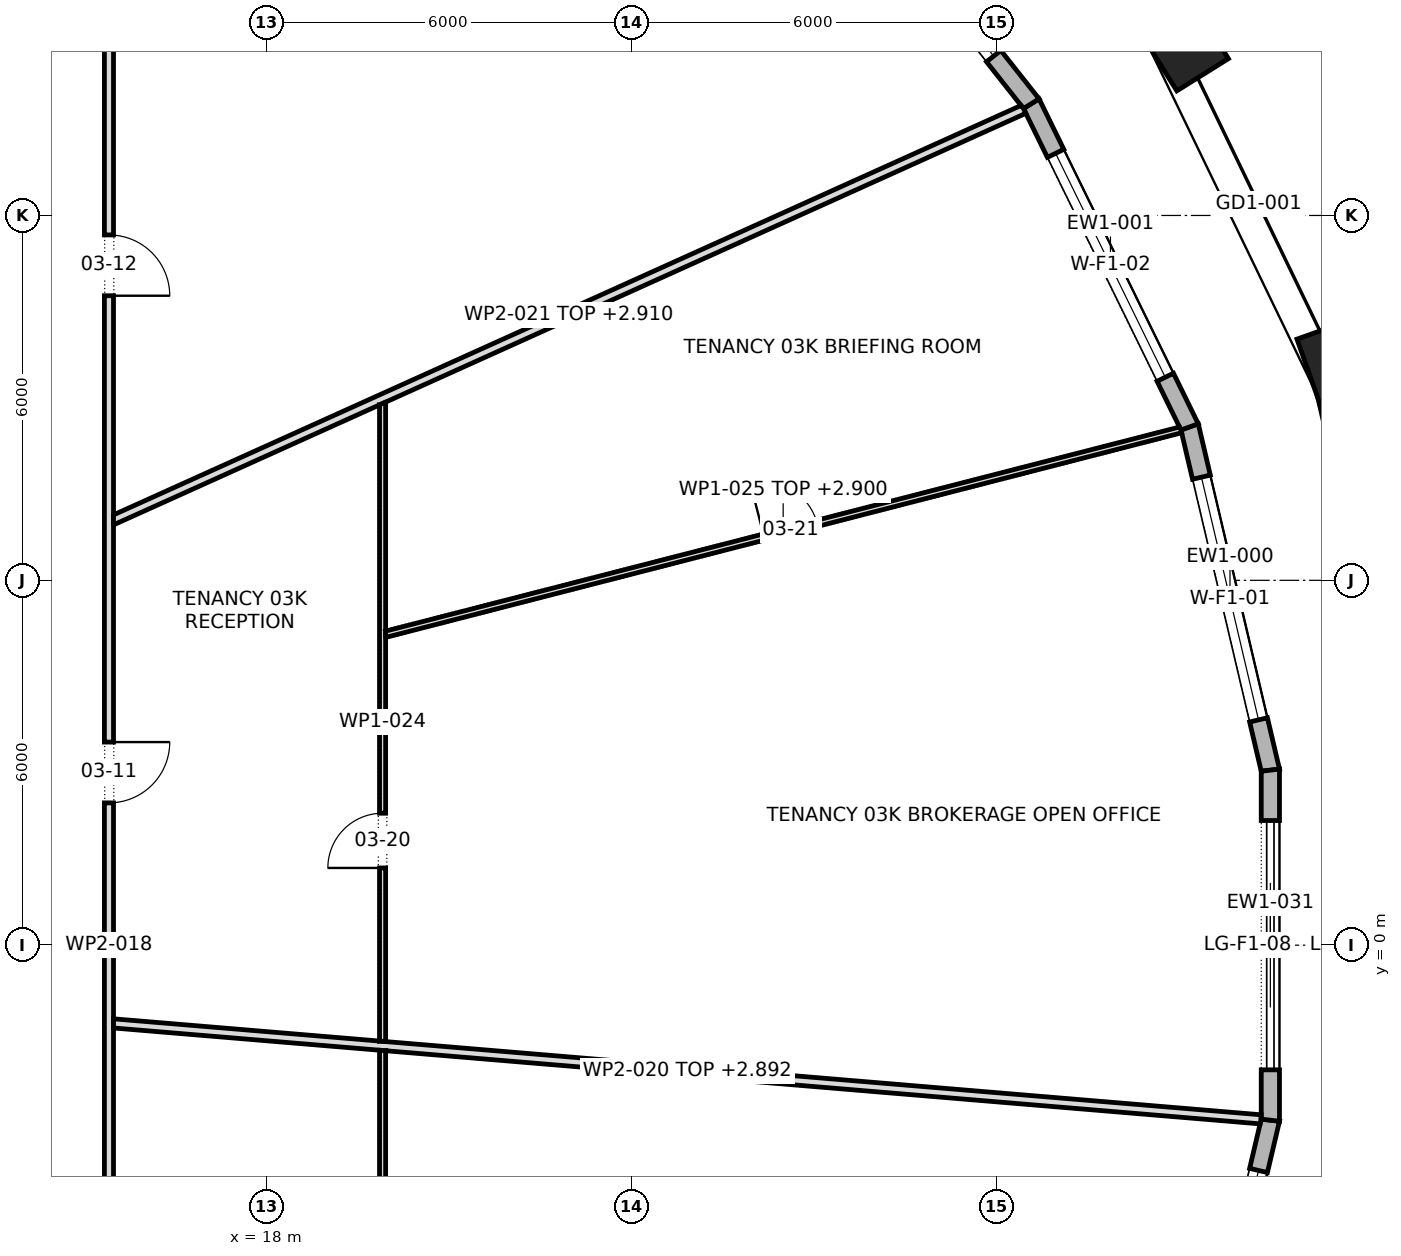
"""IFC4 building model, lengths in metres.
Left out: names, types, materials, properties, quantities, classifications, styles, units other than length and angle.
Written with IfcOpenShell. Run it as: python <this file> out.ifc"""

import sys

from ifc_helpers import new_model, si_unit, direction, frame, frame_2d, origin, origin_2d, place, context, subcontext, project, spatial, polyline, rectangle, outline, extrude, element, fill, save


model = new_model("IFC4")
c1 = context("Model", 3, precision=1e-05, world=origin(), true_north=direction((0.0, 1.0)))
c2 = subcontext(c1, "Body", "Model", "MODEL_VIEW")
j1 = project(units=[si_unit("LENGTHUNIT", "METRE"), si_unit("PLANEANGLEUNIT", "RADIAN")], contexts=[c1])
p1 = place(None, origin())
s1 = spatial("IfcSite", under=j1, at=p1, CompositionType="ELEMENT")
p2 = place(p1, origin())
s2 = spatial("IfcBuilding", under=s1, at=p2, CompositionType="ELEMENT")
p3 = place(p2, frame((0.0, 0.0, 48.7)))
s3 = spatial("IfcBuildingStorey", under=s2, at=p3, CompositionType="ELEMENT", Elevation=48.7)
for number, where, z_axis, x_axis in (
    (1, (35.709, 9.285, 0.0), (0.0, 0.0, 1.0), (-0.334, 0.943, 0.0)),
    (2, (32.91, 15.078, 0.0), (0.0, 0.0, 1.0), (-0.529, 0.849, 0.0)),
):
    element("IfcColumn", number, at=place(p3, frame(where, z_axis=z_axis, x_axis=x_axis)), inside=s3, PredefinedType="COLUMN", context=c2, shape_type="SweptSolid", body=[
        extrude(rectangle(XDim=1.8, YDim=1.0, at=origin_2d()), origin(), (0.0, 0.0, 1.0), 4.2),
    ])
p4 = place(p3, frame((34.5, 2.878, 0.0), z_axis=(0.0, 0.0, 1.0), x_axis=(-0.228990053972, 0.973428762253, 0.0)))
e3 = element("IfcWall", 3, at=p4, inside=s3, PredefinedType="STANDARD", context=c2, shape_type="SweptSolid", body=[
    extrude(outline(polyline([(-0.017, -0.15), (5.816, -0.15), (5.782, 0.15), (0.017, 0.15), (-0.017, -0.15)])), origin(), (0.0, 0.0, 1.0), 3.9),
])
p5 = place(p4, frame((0.849, 0.0, 0.6)))
e4 = element("IfcOpeningElement", 4, at=p5, cuts=e3, PredefinedType="OPENING", context=c2, shape_type="SweptSolid", body=[
    extrude(rectangle(XDim=4.1, YDim=2.85, at=frame_2d((2.05, 1.425))), frame((0.0, 0.162, 0.0), z_axis=(0.0, -1.0, 0.0), x_axis=(1.0, 0.0, 0.0)), (0.0, 0.0, 1.0), 0.324),
])
p6 = place(p3, frame((33.172, 8.523, 0.0), z_axis=(0.0, 0.0, 1.0), x_axis=(-0.439906146647, 0.898043752911, 0.0)))
e5 = element("IfcWall", 5, at=p6, inside=s3, PredefinedType="STANDARD", context=c2, shape_type="SweptSolid", body=[
    extrude(outline(polyline([(-0.017, -0.15), (5.935, -0.15), (5.903, 0.15), (0.017, 0.15), (-0.017, -0.15)])), origin(), (0.0, 0.0, 1.0), 3.9),
])
p7 = place(p6, frame((0.909, 0.0, 0.6)))
e6 = element("IfcOpeningElement", 6, at=p7, cuts=e5, PredefinedType="OPENING", context=c2, shape_type="SweptSolid", body=[
    extrude(rectangle(XDim=4.1, YDim=2.85, at=frame_2d((2.05, 1.425))), frame((0.0, 0.162, 0.0), z_axis=(0.0, -1.0, 0.0), x_axis=(1.0, 0.0, 0.0)), (0.0, 0.0, 1.0), 0.324),
])
p8 = place(p3, frame((30.568, 13.838, 0.0), z_axis=(0.0, 0.0, 1.0), x_axis=(-0.619993638342, 0.78460683684, 0.0)))
e7 = element("IfcWall", 7, at=p8, inside=s3, PredefinedType="STANDARD", context=c2, shape_type="SweptSolid", body=[
    extrude(outline(polyline([(-0.016, -0.15), (6.109, -0.15), (6.079, 0.15), (0.016, 0.15), (-0.016, -0.15)])), origin(), (0.0, 0.0, 1.0), 3.9),
])
p9 = place(p8, frame((0.997, 0.0, 0.6)))
e8 = element("IfcOpeningElement", 8, at=p9, cuts=e7, PredefinedType="OPENING", context=c2, shape_type="SweptSolid", body=[
    extrude(rectangle(XDim=4.1, YDim=2.85, at=frame_2d((2.05, 1.425))), frame((0.0, 0.162, 0.0), z_axis=(0.0, -1.0, 0.0), x_axis=(1.0, 0.0, 0.0)), (0.0, 0.0, 1.0), 0.324),
])
p10 = place(p3, frame((33.172, -8.523, 0.0), z_axis=(0.0, 0.0, 1.0), x_axis=(0.228990053972, 0.973428762253, 0.0)))
e9 = element("IfcWall", 9, at=p10, inside=s3, PredefinedType="STANDARD", context=c2, shape_type="SweptSolid", body=[
    extrude(outline(polyline([(-0.017, -0.15), (5.816, -0.15), (5.781, 0.15), (0.017, 0.15), (-0.017, -0.15)])), origin(), (0.0, 0.0, 1.0), 3.9),
])
p11 = place(p10, frame((0.849, 0.0, 0.6)))
e10 = element("IfcOpeningElement", 10, at=p11, cuts=e9, PredefinedType="OPENING", context=c2, shape_type="SweptSolid", body=[
    extrude(rectangle(XDim=4.1, YDim=2.85, at=frame_2d((2.05, 1.425))), frame((0.0, 0.162, 0.0), z_axis=(0.0, -1.0, 0.0), x_axis=(1.0, 0.0, 0.0)), (0.0, 0.0, 1.0), 0.324),
])
p12 = place(p3, frame((34.5, -2.878, 0.0), z_axis=(0.0, 0.0, 1.0), x_axis=(0.0, 1.0, 0.0)))
e11 = element("IfcWall", 11, at=p12, inside=s3, PredefinedType="STANDARD", context=c2, shape_type="SweptSolid", body=[
    extrude(outline(polyline([(-0.017, -0.15), (5.773, -0.15), (5.739, 0.15), (0.017, 0.15), (-0.017, -0.15)])), origin(), (0.0, 0.0, 1.0), 3.9),
])
p13 = place(p12, frame((0.828, 0.0, 0.0)))
e12 = element("IfcOpeningElement", 12, at=p13, cuts=e11, PredefinedType="OPENING", context=c2, shape_type="SweptSolid", body=[
    extrude(rectangle(XDim=4.1, YDim=3.45, at=frame_2d((2.05, 1.725))), frame((0.0, 0.162, 0.0), z_axis=(0.0, -1.0, 0.0), x_axis=(1.0, 0.0, 0.0)), (0.0, 0.0, 1.0), 0.324),
])
p14 = place(p3, frame((15.4, -15.475, 0.0), z_axis=(0.0, 0.0, 1.0), x_axis=(0.0, 1.0, 0.0)))
e13 = element("IfcWall", 13, at=p14, inside=s3, PredefinedType="PARTITIONING", context=c2, shape_type="SweptSolid", body=[
    extrude(outline(polyline([(0.0, -0.075), (1.935, -0.075), (3.869, -0.075), (5.803, -0.075), (7.738, -0.075), (9.672, -0.075), (11.606, -0.075), (13.541, -0.075), (15.475, -0.075), (17.409, -0.075), (19.344, -0.075), (21.278, -0.075), (23.212, -0.075), (25.147, -0.075), (27.081, -0.075), (29.016, -0.075), (30.95, -0.075), (30.8, 0.075), (28.885, 0.075), (26.969, 0.075), (25.053, 0.075), (23.138, 0.075), (21.222, 0.075), (19.306, 0.075), (17.391, 0.075), (15.475, 0.075), (13.56, 0.075), (11.644, 0.075), (9.728, 0.075), (7.812, 0.075), (5.897, 0.075), (3.981, 0.075), (2.066, 0.075), (0.15, 0.075), (0.0, -0.075)])), origin(), (0.0, 0.0, 1.0), 3.9),
])
p15 = place(p14, frame((8.99, 0.0, 0.0)))
e14 = element("IfcOpeningElement", 14, at=p15, cuts=e13, PredefinedType="OPENING", context=c2, shape_type="SweptSolid", body=[
    extrude(rectangle(XDim=1.0, YDim=2.1, at=frame_2d((0.5, 1.05))), frame((0.0, 0.087, 0.0), z_axis=(0.0, -1.0, 0.0), x_axis=(1.0, 0.0, 0.0)), (0.0, 0.0, 1.0), 0.174),
])
p16 = place(p14, frame((17.815, 0.0, 0.0)))
e15 = element("IfcOpeningElement", 15, at=p16, cuts=e13, PredefinedType="OPENING", context=c2, shape_type="SweptSolid", body=[
    extrude(rectangle(XDim=1.0, YDim=2.1, at=frame_2d((0.5, 1.05))), frame((0.0, 0.087, 0.0), z_axis=(0.0, -1.0, 0.0), x_axis=(1.0, 0.0, 0.0)), (0.0, 0.0, 1.0), 0.174),
])
p17 = place(p14, frame((26.155, 0.0, 0.0)))
e16 = element("IfcOpeningElement", 16, at=p17, cuts=e13, PredefinedType="OPENING", context=c2, shape_type="SweptSolid", body=[
    extrude(rectangle(XDim=1.0, YDim=2.1, at=frame_2d((0.5, 1.05))), frame((0.0, 0.087, 0.0), z_axis=(0.0, -1.0, 0.0), x_axis=(1.0, 0.0, 0.0)), (0.0, 0.0, 1.0), 0.174),
])
p18 = place(p3, frame((15.469, -1.286, 0.0), z_axis=(0.0, 0.0, 1.0), x_axis=(0.996520554602, -0.083347371018, 0.0)))
e17 = element("IfcWall", 17, at=p18, inside=s3, PredefinedType="PARTITIONING", context=c2, shape_type="SweptSolid", body=[
    extrude(outline(polyline([(0.012, -0.075), (1.506, -0.075), (2.999, -0.075), (4.492, -0.075), (4.503, -0.074), (4.503, -0.075), (6.307, -0.075), (8.111, -0.075), (9.915, -0.075), (11.719, -0.075), (13.523, -0.075), (15.327, -0.075), (17.131, -0.075), (18.935, -0.075), (18.94, -0.038), (18.94, 0.075), (17.122, 0.075), (15.304, 0.075), (13.486, 0.075), (11.667, 0.075), (9.849, 0.075), (8.031, 0.075), (6.213, 0.075), (4.395, 0.075), (4.39, 0.074), (4.39, 0.075), (2.927, 0.075), (1.463, 0.075), (0.0, 0.075), (0.012, -0.075)])), origin(), (0.0, 0.0, 1.0), 2.892),
])
p19 = place(p3, frame((15.444, 6.98, 0.0), z_axis=(0.0, 0.0, 1.0), x_axis=(0.911545333682, 0.411199592221, 0.0)))
e18 = element("IfcWall", 18, at=p19, inside=s3, PredefinedType="PARTITIONING", context=c2, shape_type="SweptSolid", body=[
    extrude(outline(polyline([(0.0, -0.075), (1.6, -0.075), (3.2, -0.075), (4.8, -0.075), (4.801, -0.073), (4.805, -0.075), (6.747, -0.075), (8.69, -0.075), (10.632, -0.075), (12.574, -0.075), (14.517, -0.075), (16.459, -0.075), (16.459, -0.072), (16.457, 0.012), (16.441, 0.075), (14.622, 0.075), (12.802, 0.075), (10.983, 0.075), (9.164, 0.075), (7.345, 0.075), (5.525, 0.075), (3.706, 0.075), (1.887, 0.075), (0.068, 0.075), (0.0, -0.075)])), origin(), (0.0, 0.0, 1.0), 2.91),
])
p20 = place(p3, frame((19.9, -13.756, 0.0), z_axis=(0.0, 0.0, 1.0), x_axis=(0.0, 1.0, 0.0)))
e19 = element("IfcWall", 19, at=p20, inside=s3, PredefinedType="PARTITIONING", context=c2, shape_type="SweptSolid", body=[
    extrude(outline(polyline([(0.0, -0.05), (1.563, -0.05), (3.125, -0.05), (4.688, -0.05), (4.689, -0.048), (4.694, -0.05), (6.525, -0.05), (8.357, -0.05), (10.188, -0.05), (12.02, -0.05), (12.028, 0.049), (12.028, 0.05), (10.035, 0.05), (8.042, 0.05), (6.049, 0.05), (4.056, 0.05), (2.062, 0.05), (0.069, 0.05), (0.0, -0.05), (0.0, -0.05)])), origin(), (0.0, 0.0, 1.0), 3.9),
])
p21 = place(p20, frame((7.98, 0.0, 0.0)))
e20 = element("IfcOpeningElement", 20, at=p21, cuts=e19, PredefinedType="OPENING", context=c2, shape_type="SweptSolid", body=[
    extrude(rectangle(XDim=0.9, YDim=2.1, at=frame_2d((0.45, 1.05))), frame((0.0, 0.062, 0.0), z_axis=(0.0, -1.0, 0.0), x_axis=(1.0, 0.0, 0.0)), (0.0, 0.0, 1.0), 0.124),
])
p22 = place(p3, frame((19.9, -1.585, 0.0), z_axis=(0.0, 0.0, 1.0), x_axis=(0.0, 1.0, 0.0)))
e21 = element("IfcWall", 21, at=p22, inside=s3, PredefinedType="PARTITIONING", context=c2, shape_type="SweptSolid", body=[
    extrude(outline(polyline([(0.0, -0.05), (1.686, -0.05), (3.371, -0.05), (5.056, -0.05), (6.742, -0.05), (6.749, -0.048), (6.75, -0.05), (8.632, -0.05), (10.515, -0.05), (10.515, -0.049), (10.47, 0.05), (8.726, 0.05), (6.983, 0.05), (5.239, 0.05), (3.495, 0.05), (1.752, 0.05), (0.008, 0.05), (0.0, -0.046), (0.0, -0.05)])), origin(), (0.0, 0.0, 1.0), 3.9),
])
p23 = place(p22, frame((2.855, 0.0, 0.0)))
e22 = element("IfcOpeningElement", 22, at=p23, cuts=e21, PredefinedType="OPENING", context=c2, shape_type="SweptSolid", body=[
    extrude(rectangle(XDim=0.9, YDim=2.1, at=frame_2d((0.45, 1.05))), frame((0.0, 0.062, 0.0), z_axis=(0.0, -1.0, 0.0), x_axis=(1.0, 0.0, 0.0)), (0.0, 0.0, 1.0), 0.124),
])
p24 = place(p3, frame((19.938, 5.11, 0.0), z_axis=(0.0, 0.0, 1.0), x_axis=(0.968505877435, 0.248990693348, 0.0)))
e23 = element("IfcWall", 23, at=p24, inside=s3, PredefinedType="PARTITIONING", context=c2, shape_type="SweptSolid", body=[
    extrude(outline(polyline([(13.515, -0.05), (13.515, 0.003), (13.506, 0.05), (11.58, 0.05), (9.654, 0.05), (7.729, 0.05), (5.803, 0.05), (3.877, 0.05), (1.951, 0.05), (0.026, 0.05), (0.0, -0.049), (0.0, -0.05), (1.931, -0.05), (3.862, -0.05), (5.792, -0.05), (7.723, -0.05), (9.654, -0.05), (11.585, -0.05), (13.515, -0.05)])), origin(), (0.0, 0.0, 1.0), 2.9),
])
p25 = place(p24, frame((6.439, 0.0, 0.0)))
e24 = element("IfcOpeningElement", 24, at=p25, cuts=e23, PredefinedType="OPENING", context=c2, shape_type="SweptSolid", body=[
    extrude(rectangle(XDim=0.9, YDim=2.1, at=frame_2d((0.45, 1.05))), frame((0.0, 0.062, 0.0), z_axis=(0.0, -1.0, 0.0), x_axis=(1.0, 0.0, 0.0)), (0.0, 0.0, 1.0), 0.124),
])
p26 = place(p5, origin())
e25 = element("IfcWindow", 25, at=p26, inside=s3, PartitioningType="TRIPLE_PANEL_VERTICAL", PredefinedType="WINDOW", context=c2, shape_type="SweptSolid", body=[
    extrude(rectangle(XDim=4.1, YDim=2.85, at=frame_2d((2.05, 1.425))), frame((0.0, 0.03, 0.0), z_axis=(0.0, -1.0, 0.0), x_axis=(1.0, 0.0, 0.0)), (0.0, 0.0, 1.0), 0.06),
])
fill(e4, e25)
p27 = place(p7, origin())
e26 = element("IfcWindow", 26, at=p27, inside=s3, PartitioningType="TRIPLE_PANEL_VERTICAL", PredefinedType="WINDOW", context=c2, shape_type="SweptSolid", body=[
    extrude(rectangle(XDim=4.1, YDim=2.85, at=frame_2d((2.05, 1.425))), frame((0.0, 0.03, 0.0), z_axis=(0.0, -1.0, 0.0), x_axis=(1.0, 0.0, 0.0)), (0.0, 0.0, 1.0), 0.06),
])
fill(e6, e26)
p28 = place(p9, origin())
e27 = element("IfcWindow", 27, at=p28, inside=s3, PartitioningType="TRIPLE_PANEL_VERTICAL", PredefinedType="WINDOW", context=c2, shape_type="SweptSolid", body=[
    extrude(rectangle(XDim=4.1, YDim=2.85, at=frame_2d((2.05, 1.425))), frame((0.0, 0.03, 0.0), z_axis=(0.0, -1.0, 0.0), x_axis=(1.0, 0.0, 0.0)), (0.0, 0.0, 1.0), 0.06),
])
fill(e8, e27)
p29 = place(p11, origin())
e28 = element("IfcWindow", 28, at=p29, inside=s3, PartitioningType="TRIPLE_PANEL_VERTICAL", PredefinedType="WINDOW", context=c2, shape_type="SweptSolid", body=[
    extrude(rectangle(XDim=4.1, YDim=2.85, at=frame_2d((2.05, 1.425))), frame((0.0, 0.03, 0.0), z_axis=(0.0, -1.0, 0.0), x_axis=(1.0, 0.0, 0.0)), (0.0, 0.0, 1.0), 0.06),
])
fill(e10, e28)
p30 = place(p13, origin())
e29 = element("IfcDoor", 29, at=p30, inside=s3, OperationType="DOUBLE_DOOR_SLIDING", PredefinedType="DOOR", context=c2, shape_type="SweptSolid", body=[
    extrude(rectangle(XDim=4.1, YDim=3.45, at=frame_2d((2.05, 1.725))), frame((0.0, 0.025, 0.0), z_axis=(0.0, -1.0, 0.0), x_axis=(1.0, 0.0, 0.0)), (0.0, 0.0, 1.0), 0.05),
])
fill(e12, e29)
p31 = place(p16, frame((1.0, 0.0, 0.0), z_axis=(0.0, 0.0, 1.0), x_axis=(-1.0, 0.0, 0.0)))
e30 = element("IfcDoor", 30, at=p31, inside=s3, OperationType="SINGLE_SWING_RIGHT", PredefinedType="DOOR", context=c2, shape_type="SweptSolid", body=[
    extrude(rectangle(XDim=1.0, YDim=2.1, at=frame_2d((0.5, 1.05))), frame((0.0, 0.025, 0.0), z_axis=(0.0, -1.0, 0.0), x_axis=(1.0, 0.0, 0.0)), (0.0, 0.0, 1.0), 0.05),
])
fill(e15, e30)
p32 = place(p17, frame((1.0, 0.0, 0.0), z_axis=(0.0, 0.0, 1.0), x_axis=(-1.0, 0.0, 0.0)))
e31 = element("IfcDoor", 31, at=p32, inside=s3, OperationType="SINGLE_SWING_LEFT", PredefinedType="DOOR", context=c2, shape_type="SweptSolid", body=[
    extrude(rectangle(XDim=1.0, YDim=2.1, at=frame_2d((0.5, 1.05))), frame((0.0, 0.025, 0.0), z_axis=(0.0, -1.0, 0.0), x_axis=(1.0, 0.0, 0.0)), (0.0, 0.0, 1.0), 0.05),
])
fill(e16, e31)
p33 = place(p23, origin())
e32 = element("IfcDoor", 32, at=p33, inside=s3, OperationType="SINGLE_SWING_RIGHT", PredefinedType="DOOR", context=c2, shape_type="SweptSolid", body=[
    extrude(rectangle(XDim=0.9, YDim=2.1, at=frame_2d((0.45, 1.05))), frame((0.0, 0.025, 0.0), z_axis=(0.0, -1.0, 0.0), x_axis=(1.0, 0.0, 0.0)), (0.0, 0.0, 1.0), 0.05),
])
fill(e22, e32)
p34 = place(p25, origin())
e33 = element("IfcDoor", 33, at=p34, inside=s3, OperationType="SINGLE_SWING_RIGHT", PredefinedType="DOOR", context=c2, shape_type="SweptSolid", body=[
    extrude(rectangle(XDim=0.9, YDim=2.1, at=frame_2d((0.45, 1.05))), frame((0.0, 0.025, 0.0), z_axis=(0.0, -1.0, 0.0), x_axis=(1.0, 0.0, 0.0)), (0.0, 0.0, 1.0), 0.05),
])
fill(e24, e33)
save(model, sys.argv[1])
